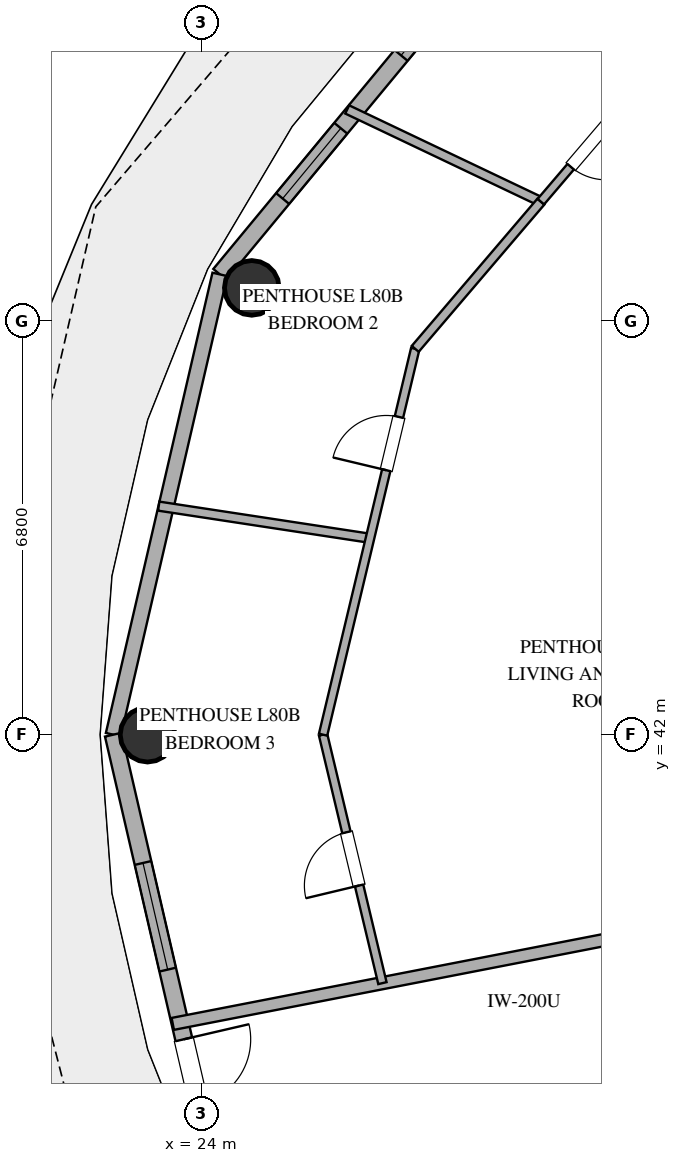
"""IFC4 building model, lengths in metres.
Left out: names, types, materials, properties, quantities, classifications, styles, units other than length and angle.
Written with IfcOpenShell. Run it as: python <this file> out.ifc"""

import sys

from ifc_helpers import new_model, si_unit, direction, frame, frame_2d, origin, origin_2d, place, context, subcontext, project, spatial, rectangle, hollow_circle, extrude, element, fill, save


model = new_model("IFC4")
c1 = context("Model", 3, precision=1e-05, world=origin(), true_north=direction((0.0, 1.0)))
c2 = subcontext(c1, "Body", "Model", "MODEL_VIEW")
j1 = project(units=[si_unit("LENGTHUNIT", "METRE"), si_unit("PLANEANGLEUNIT", "RADIAN")], contexts=[c1])
p1 = place(None, origin())
s1 = spatial("IfcSite", under=j1, at=p1, CompositionType="ELEMENT")
p2 = place(p1, origin())
s2 = spatial("IfcBuilding", under=s1, at=p2, CompositionType="ELEMENT")
p3 = place(p2, frame((0.0, 0.0, 309.0)))
s3 = spatial("IfcBuildingStorey", under=s2, at=p3, CompositionType="ELEMENT", Elevation=309.0)
for number, where, z_axis, x_axis in (
    (1, (24.831, 49.347, 0.0), (0.0, 0.0, 1.0), (1.0, 0.0, 0.0)),
    (2, (23.117, 42.0, 0.0), (0.0, 0.0, 1.0), (1.0, 0.0, 0.0)),
):
    element("IfcColumn", number, at=place(p3, frame(where, z_axis=z_axis, x_axis=x_axis)), inside=s3, PredefinedType="COLUMN", context=c2, shape_type="SweptSolid", body=[
        extrude(hollow_circle(Radius=0.45, WallThickness=0.025, at=origin_2d()), origin(), (0.0, 0.0, 1.0), 3.37),
    ])
p4 = place(p3, frame((29.617, 55.987, 0.0), z_axis=(0.0, 0.0, 1.0), x_axis=(-0.63761509934, -0.770355103243, 0.0)))
e3 = element("IfcWall", 3, at=p4, inside=s3, PredefinedType="SOLIDWALL", context=c2, shape_type="SweptSolid", body=[
    extrude(rectangle(XDim=8.33, YDim=0.28, at=frame_2d((4.165, 0.0))), origin(), (0.0, 0.0, 1.0), 3.37),
])
p5 = place(p4, frame((2.456, 0.0, 0.85)))
e4 = element("IfcOpeningElement", 4, at=p5, cuts=e3, PredefinedType="OPENING", context=c2, shape_type="SweptSolid", body=[
    extrude(rectangle(XDim=1.2, YDim=1.6, at=frame_2d((0.6, 0.8))), frame((0.0, 0.15, 0.0), z_axis=(0.0, -1.0, 0.0), x_axis=(1.0, 0.0, 0.0)), (0.0, 0.0, 1.0), 0.3),
])
p6 = place(p4, frame((5.211, 0.0, 0.85)))
e5 = element("IfcOpeningElement", 5, at=p6, cuts=e3, PredefinedType="OPENING", context=c2, shape_type="SweptSolid", body=[
    extrude(rectangle(XDim=1.5, YDim=2.0, at=frame_2d((0.75, 1.0))), frame((0.0, 0.15, 0.0), z_axis=(0.0, -1.0, 0.0), x_axis=(1.0, 0.0, 0.0)), (0.0, 0.0, 1.0), 0.3),
])
p7 = place(p3, frame((24.306, 49.57, 0.0), z_axis=(0.0, 0.0, 1.0), x_axis=(-0.225635078214, -0.974211892495, 0.0)))
e6 = element("IfcWall", 6, at=p7, inside=s3, PredefinedType="SOLIDWALL", context=c2, shape_type="SweptSolid", body=[
    extrude(rectangle(XDim=7.77, YDim=0.25, at=frame_2d((3.885, 0.0))), origin(), (0.0, 0.0, 1.0), 3.37),
])
p8 = place(p3, frame((22.553, 42.0, 0.0), z_axis=(0.0, 0.0, 1.0), x_axis=(0.225635078214, -0.974211892495, 0.0)))
e7 = element("IfcWall", 7, at=p8, inside=s3, PredefinedType="SOLIDWALL", context=c2, shape_type="SweptSolid", body=[
    extrude(rectangle(XDim=7.77, YDim=0.28, at=frame_2d((3.885, 0.0))), origin(), (0.0, 0.0, 1.0), 3.37),
])
p9 = place(p8, frame((2.166, 0.0, 0.85)))
e8 = element("IfcOpeningElement", 8, at=p9, cuts=e7, PredefinedType="OPENING", context=c2, shape_type="SweptSolid", body=[
    extrude(rectangle(XDim=1.8, YDim=2.2, at=frame_2d((0.9, 1.1))), frame((0.0, 0.15, 0.0), z_axis=(0.0, -1.0, 0.0), x_axis=(1.0, 0.0, 0.0)), (0.0, 0.0, 1.0), 0.3),
])
p10 = place(p8, frame((5.142, 0.0, 0.0)))
e9 = element("IfcOpeningElement", 9, at=p10, cuts=e7, PredefinedType="OPENING", context=c2, shape_type="SweptSolid", body=[
    extrude(rectangle(XDim=1.1, YDim=2.25, at=frame_2d((0.55, 1.125))), frame((0.0, 0.15, 0.0), z_axis=(0.0, -1.0, 0.0), x_axis=(1.0, 0.0, 0.0)), (0.0, 0.0, 1.0), 0.3),
])
p11 = place(p3, frame((34.8, 39.434, 0.0), z_axis=(0.0, 0.0, 1.0), x_axis=(-0.981626456647, -0.190812734402, 0.0)))
e10 = element("IfcWall", 10, at=p11, inside=s3, PredefinedType="PARTITIONING", context=c2, shape_type="SweptSolid", body=[
    extrude(rectangle(XDim=11.479, YDim=0.2, at=frame_2d((5.74, 0.0))), origin(), (0.0, 0.0, 1.0), 2.73),
])
p12 = place(p3, frame((26.979, 37.914, 0.0), z_axis=(0.0, 0.0, 1.0), x_axis=(-0.23229355625, 0.972645723645, 0.0)))
e11 = element("IfcWall", 11, at=p12, inside=s3, PredefinedType="PARTITIONING", context=c2, shape_type="SweptSolid", body=[
    extrude(rectangle(XDim=4.201, YDim=0.14, at=frame_2d((2.101, 0.0))), origin(), (0.0, 0.0, 1.0), 2.73),
])
p13 = place(p12, frame((1.65, 0.0, 0.0)))
e12 = element("IfcOpeningElement", 12, at=p13, cuts=e11, PredefinedType="OPENING", context=c2, shape_type="SweptSolid", body=[
    extrude(rectangle(XDim=0.9, YDim=2.1, at=frame_2d((0.45, 1.05))), frame((0.0, 0.08, 0.0), z_axis=(0.0, -1.0, 0.0), x_axis=(1.0, 0.0, 0.0)), (0.0, 0.0, 1.0), 0.16),
])
p14 = place(p3, frame((26.4, 52.282, 0.0), z_axis=(0.0, 0.0, 1.0), x_axis=(0.902924474477, -0.429799247777, 0.0)))
e13 = element("IfcWall", 13, at=p14, inside=s3, PredefinedType="PARTITIONING", context=c2, shape_type="SweptSolid", body=[
    extrude(rectangle(XDim=3.528, YDim=0.15, at=frame_2d((1.764, 0.0))), origin(), (0.0, 0.0, 1.0), 2.73),
])
p15 = place(p3, frame((26.775, 45.23, 0.0), z_axis=(0.0, 0.0, 1.0), x_axis=(-0.988623329482, 0.150412474232, 0.0)))
e14 = element("IfcWall", 14, at=p15, inside=s3, PredefinedType="PARTITIONING", context=c2, shape_type="SweptSolid", body=[
    extrude(rectangle(XDim=3.514, YDim=0.15, at=frame_2d((1.757, 0.0))), origin(), (0.0, 0.0, 1.0), 2.73),
])
p16 = place(p3, frame((26.004, 42.0, 0.0), z_axis=(0.0, 0.0, 1.0), x_axis=(0.232298462197, 0.972644551962, 0.0)))
e15 = element("IfcWall", 15, at=p16, inside=s3, PredefinedType="PARTITIONING", context=c2, shape_type="SweptSolid", body=[
    extrude(rectangle(XDim=6.523, YDim=0.14, at=frame_2d((3.262, 0.0))), origin(), (0.0, 0.0, 1.0), 2.73),
])
p17 = place(p16, frame((4.472, 0.0, 0.0)))
e16 = element("IfcOpeningElement", 16, at=p17, cuts=e15, PredefinedType="OPENING", context=c2, shape_type="SweptSolid", body=[
    extrude(rectangle(XDim=0.9, YDim=2.1, at=frame_2d((0.45, 1.05))), frame((0.0, 0.08, 0.0), z_axis=(0.0, -1.0, 0.0), x_axis=(1.0, 0.0, 0.0)), (0.0, 0.0, 1.0), 0.16),
])
p18 = place(p3, frame((29.585, 50.766, 0.0), z_axis=(0.0, 0.0, 1.0), x_axis=(-0.649223419945, -0.760597759, 0.0)))
e17 = element("IfcWall", 17, at=p18, inside=s3, PredefinedType="PARTITIONING", context=c2, shape_type="SweptSolid", body=[
    extrude(rectangle(XDim=3.183, YDim=0.15, at=frame_2d((1.591, 0.0))), origin(), (0.0, 0.0, 1.0), 2.73),
])
p19 = place(p3, frame((31.15, 52.599, 0.0), z_axis=(0.0, 0.0, 1.0), x_axis=(-0.649188051026, -0.760627947426, 0.0)))
e18 = element("IfcWall", 18, at=p19, inside=s3, PredefinedType="PARTITIONING", context=c2, shape_type="SweptSolid", body=[
    extrude(rectangle(XDim=2.41, YDim=0.14, at=frame_2d((1.205, 0.0))), origin(), (0.0, 0.0, 1.0), 2.73),
])
p20 = place(p19, frame((0.755, 0.0, 0.0)))
e19 = element("IfcOpeningElement", 19, at=p20, cuts=e18, PredefinedType="OPENING", context=c2, shape_type="SweptSolid", body=[
    extrude(rectangle(XDim=0.9, YDim=2.1, at=frame_2d((0.45, 1.05))), frame((0.0, 0.08, 0.0), z_axis=(0.0, -1.0, 0.0), x_axis=(1.0, 0.0, 0.0)), (0.0, 0.0, 1.0), 0.16),
])
p21 = place(p5, origin())
e20 = element("IfcWindow", 20, at=p21, inside=s3, PartitioningType="SINGLE_PANEL", PredefinedType="WINDOW", context=c2, shape_type="SweptSolid", body=[
    extrude(rectangle(XDim=1.2, YDim=1.6, at=frame_2d((0.6, 0.8))), frame((0.0, 0.03, 0.0), z_axis=(0.0, -1.0, 0.0), x_axis=(1.0, 0.0, 0.0)), (0.0, 0.0, 1.0), 0.06),
])
fill(e4, e20)
p22 = place(p6, origin())
e21 = element("IfcWindow", 21, at=p22, inside=s3, PartitioningType="SINGLE_PANEL", PredefinedType="WINDOW", context=c2, shape_type="SweptSolid", body=[
    extrude(rectangle(XDim=1.5, YDim=2.0, at=frame_2d((0.75, 1.0))), frame((0.0, 0.03, 0.0), z_axis=(0.0, -1.0, 0.0), x_axis=(1.0, 0.0, 0.0)), (0.0, 0.0, 1.0), 0.06),
])
fill(e5, e21)
p23 = place(p9, origin())
e22 = element("IfcWindow", 22, at=p23, inside=s3, PartitioningType="SINGLE_PANEL", PredefinedType="WINDOW", context=c2, shape_type="SweptSolid", body=[
    extrude(rectangle(XDim=1.8, YDim=2.2, at=frame_2d((0.9, 1.1))), frame((0.0, 0.03, 0.0), z_axis=(0.0, -1.0, 0.0), x_axis=(1.0, 0.0, 0.0)), (0.0, 0.0, 1.0), 0.06),
])
fill(e8, e22)
p24 = place(p10, origin())
e23 = element("IfcDoor", 23, at=p24, inside=s3, OperationType="SINGLE_SWING_LEFT", PredefinedType="DOOR", context=c2, shape_type="SweptSolid", body=[
    extrude(rectangle(XDim=1.1, YDim=2.25, at=frame_2d((0.55, 1.125))), frame((0.0, 0.025, 0.0), z_axis=(0.0, -1.0, 0.0), x_axis=(1.0, 0.0, 0.0)), (0.0, 0.0, 1.0), 0.05),
])
fill(e9, e23)
p25 = place(p13, origin())
e24 = element("IfcDoor", 24, at=p25, inside=s3, OperationType="SINGLE_SWING_LEFT", PredefinedType="DOOR", context=c2, shape_type="SweptSolid", body=[
    extrude(rectangle(XDim=0.9, YDim=2.1, at=frame_2d((0.45, 1.05))), frame((0.0, 0.025, 0.0), z_axis=(0.0, -1.0, 0.0), x_axis=(1.0, 0.0, 0.0)), (0.0, 0.0, 1.0), 0.05),
])
fill(e12, e24)
p26 = place(p17, origin())
e25 = element("IfcDoor", 25, at=p26, inside=s3, OperationType="SINGLE_SWING_LEFT", PredefinedType="DOOR", context=c2, shape_type="SweptSolid", body=[
    extrude(rectangle(XDim=0.9, YDim=2.1, at=frame_2d((0.45, 1.05))), frame((0.0, 0.025, 0.0), z_axis=(0.0, -1.0, 0.0), x_axis=(1.0, 0.0, 0.0)), (0.0, 0.0, 1.0), 0.05),
])
fill(e16, e25)
p27 = place(p20, origin())
e26 = element("IfcDoor", 26, at=p27, inside=s3, OperationType="SINGLE_SWING_LEFT", PredefinedType="DOOR", context=c2, shape_type="SweptSolid", body=[
    extrude(rectangle(XDim=0.9, YDim=2.1, at=frame_2d((0.45, 1.05))), frame((0.0, 0.025, 0.0), z_axis=(0.0, -1.0, 0.0), x_axis=(1.0, 0.0, 0.0)), (0.0, 0.0, 1.0), 0.05),
])
fill(e19, e26)
save(model, sys.argv[1])
